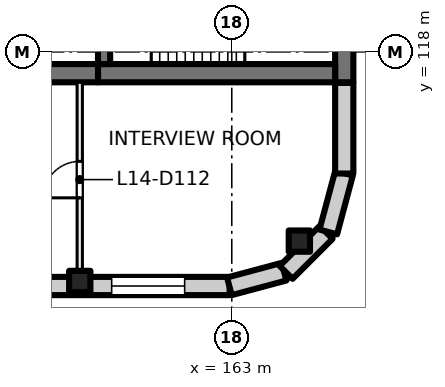
"""IFC4 building model, lengths in metres.
Left out: names, types, materials, properties, quantities, classifications, styles, units other than length and angle.
Written with IfcOpenShell. Run it as: python <this file> out.ifc"""

import sys

from ifc_helpers import new_model, si_unit, direction, frame, frame_2d, origin, origin_2d, place, context, subcontext, project, spatial, rectangle, extrude, element, fill, save


model = new_model("IFC4")
c1 = context("Model", 3, precision=1e-05, world=origin(), true_north=direction((0.0, 1.0)))
c2 = subcontext(c1, "Body", "Model", "MODEL_VIEW")
j1 = project(units=[si_unit("LENGTHUNIT", "METRE"), si_unit("PLANEANGLEUNIT", "RADIAN")], contexts=[c1])
p1 = place(None, origin())
s1 = spatial("IfcSite", under=j1, at=p1, CompositionType="ELEMENT")
p2 = place(p1, origin())
s2 = spatial("IfcBuilding", under=s1, at=p2, CompositionType="ELEMENT")
p3 = place(p2, frame((0.0, 0.0, 63.5)))
s3 = spatial("IfcBuildingStorey", under=s2, at=p3, CompositionType="ELEMENT", Elevation=63.5)
for number, where, z_axis, x_axis in (
    (1, (165.223, 111.777, 0.0), (0.0, 0.0, 1.0), (1.0, 0.0, 0.0)),
    (2, (158.0, 110.45, 0.0), (0.0, 0.0, 1.0), (1.0, 0.0, 0.0)),
):
    element("IfcColumn", number, at=place(p3, frame(where, z_axis=z_axis, x_axis=x_axis)), inside=s3, PredefinedType="COLUMN", context=c2, shape_type="SweptSolid", body=[
        extrude(rectangle(XDim=0.7, YDim=0.7, at=origin_2d()), origin(), (0.0, 0.0, 1.0), 4.0),
    ])
p4 = place(p3, frame((166.7, 120.8, 0.0), z_axis=(0.0, 0.0, 1.0), x_axis=(0.0, -1.0, 0.0)))
e3 = element("IfcWall", 3, at=p4, inside=s3, PredefinedType="SHEAR", context=c2, shape_type="SweptSolid", body=[
    extrude(rectangle(XDim=3.8, YDim=0.6, at=frame_2d((1.9, 0.0))), origin(), (0.0, 0.0, 1.0), 4.0),
])
p5 = place(p3, frame((166.4, 117.3, 0.0), z_axis=(0.0, 0.0, 1.0), x_axis=(-1.0, 0.0, 0.0)))
e4 = element("IfcWall", 4, at=p5, inside=s3, PredefinedType="SHEAR", context=c2, shape_type="SweptSolid", body=[
    extrude(rectangle(XDim=7.8, YDim=0.6, at=frame_2d((3.9, 0.0))), origin(), (0.0, 0.0, 1.0), 4.0),
])
p6 = place(p3, frame((158.6, 117.3, 0.0), z_axis=(0.0, 0.0, 1.0), x_axis=(-1.0, 0.0, 0.0)))
e5 = element("IfcWall", 5, at=p6, inside=s3, PredefinedType="SHEAR", context=c2, shape_type="SweptSolid", body=[
    extrude(rectangle(XDim=4.6, YDim=0.6, at=frame_2d((2.3, 0.0))), origin(), (0.0, 0.0, 1.0), 4.0),
])
p7 = place(p3, frame((158.8, 120.4, 0.0), z_axis=(0.0, 0.0, 1.0), x_axis=(0.0, -1.0, 0.0)))
e6 = element("IfcWall", 6, at=p7, inside=s3, PredefinedType="SHEAR", context=c2, shape_type="SweptSolid", body=[
    extrude(rectangle(XDim=2.8, YDim=0.4, at=frame_2d((1.4, 0.0))), origin(), (0.0, 0.0, 1.0), 4.0),
])
p8 = place(p7, frame((0.9, 0.0, 0.0)))
e7 = element("IfcOpeningElement", 7, at=p8, cuts=e6, PredefinedType="OPENING", context=c2, shape_type="SweptSolid", body=[
    extrude(rectangle(XDim=1.0, YDim=2.1, at=frame_2d((0.5, 1.05))), frame((0.0, 0.21, 0.0), z_axis=(0.0, -1.0, 0.0), x_axis=(1.0, 0.0, 0.0)), (0.0, 0.0, 1.0), 0.42),
])
p9 = place(p3, frame((162.93, 110.3, 0.0), z_axis=(0.0, 0.0, 1.0), x_axis=(-1.0, 0.0, 0.0)))
e8 = element("IfcWall", 8, at=p9, inside=s3, PredefinedType="SOLIDWALL", context=c2, shape_type="SweptSolid", body=[
    extrude(rectangle(XDim=31.93, YDim=0.6, at=frame_2d((15.965, 0.0))), origin(), (0.0, 0.0, 1.0), 3.625),
])
p10 = place(p9, frame((1.48, 0.0, 0.9)))
e9 = element("IfcOpeningElement", 9, at=p10, cuts=e8, PredefinedType="OPENING", context=c2, shape_type="SweptSolid", body=[
    extrude(rectangle(XDim=2.4, YDim=2.4, at=frame_2d((1.2, 1.2))), frame((0.0, 0.31, 0.0), z_axis=(0.0, -1.0, 0.0), x_axis=(1.0, 0.0, 0.0)), (0.0, 0.0, 1.0), 0.62),
])
p11 = place(p9, frame((5.98, 0.0, 0.9)))
e10 = element("IfcOpeningElement", 10, at=p11, cuts=e8, PredefinedType="OPENING", context=c2, shape_type="SweptSolid", body=[
    extrude(rectangle(XDim=2.4, YDim=2.4, at=frame_2d((1.2, 1.2))), frame((0.0, 0.31, 0.0), z_axis=(0.0, -1.0, 0.0), x_axis=(1.0, 0.0, 0.0)), (0.0, 0.0, 1.0), 0.62),
])
p12 = place(p9, frame((10.48, 0.0, 0.9)))
e11 = element("IfcOpeningElement", 11, at=p12, cuts=e8, PredefinedType="OPENING", context=c2, shape_type="SweptSolid", body=[
    extrude(rectangle(XDim=2.4, YDim=2.4, at=frame_2d((1.2, 1.2))), frame((0.0, 0.31, 0.0), z_axis=(0.0, -1.0, 0.0), x_axis=(1.0, 0.0, 0.0)), (0.0, 0.0, 1.0), 0.62),
])
p13 = place(p9, frame((14.98, 0.0, 0.9)))
e12 = element("IfcOpeningElement", 12, at=p13, cuts=e8, PredefinedType="OPENING", context=c2, shape_type="SweptSolid", body=[
    extrude(rectangle(XDim=2.4, YDim=2.4, at=frame_2d((1.2, 1.2))), frame((0.0, 0.31, 0.0), z_axis=(0.0, -1.0, 0.0), x_axis=(1.0, 0.0, 0.0)), (0.0, 0.0, 1.0), 0.62),
])
p14 = place(p9, frame((19.48, 0.0, 0.9)))
e13 = element("IfcOpeningElement", 13, at=p14, cuts=e8, PredefinedType="OPENING", context=c2, shape_type="SweptSolid", body=[
    extrude(rectangle(XDim=2.4, YDim=2.4, at=frame_2d((1.2, 1.2))), frame((0.0, 0.31, 0.0), z_axis=(0.0, -1.0, 0.0), x_axis=(1.0, 0.0, 0.0)), (0.0, 0.0, 1.0), 0.62),
])
p15 = place(p9, frame((23.98, 0.0, 0.9)))
e14 = element("IfcOpeningElement", 14, at=p15, cuts=e8, PredefinedType="OPENING", context=c2, shape_type="SweptSolid", body=[
    extrude(rectangle(XDim=2.4, YDim=2.4, at=frame_2d((1.2, 1.2))), frame((0.0, 0.31, 0.0), z_axis=(0.0, -1.0, 0.0), x_axis=(1.0, 0.0, 0.0)), (0.0, 0.0, 1.0), 0.62),
])
p16 = place(p9, frame((28.48, 0.0, 0.9)))
e15 = element("IfcOpeningElement", 15, at=p16, cuts=e8, PredefinedType="OPENING", context=c2, shape_type="SweptSolid", body=[
    extrude(rectangle(XDim=2.4, YDim=2.4, at=frame_2d((1.2, 1.2))), frame((0.0, 0.31, 0.0), z_axis=(0.0, -1.0, 0.0), x_axis=(1.0, 0.0, 0.0)), (0.0, 0.0, 1.0), 0.62),
])
for number, where, z_axis, x_axis in (
    (16, (164.719, 110.771, 0.0), (0.0, 0.0, 1.0), (-0.966, -0.259, 0.0)),
    (17, (166.104, 112.064, 0.0), (0.0, 0.0, 1.0), (-0.707, -0.707, 0.0)),
):
    element("IfcWall", number, at=place(p3, frame(where, z_axis=z_axis, x_axis=x_axis)), inside=s3, PredefinedType="SOLIDWALL", context=c2, shape_type="SweptSolid", body=[
        extrude(rectangle(XDim=1.861, YDim=0.6, at=frame_2d((0.93, 0.0))), origin(), (0.0, 0.0, 1.0), 3.625),
    ])
p17 = place(p3, frame((166.692, 114.01, 0.0), z_axis=(0.0, 0.0, 1.0), x_axis=(-0.258839784042, -0.965920269068, 0.0)))
e18 = element("IfcWall", 18, at=p17, inside=s3, PredefinedType="SOLIDWALL", context=c2, shape_type="SweptSolid", body=[
    extrude(rectangle(XDim=2.0, YDim=0.6, at=frame_2d((1.0, 0.0))), origin(), (0.0, 0.0, 1.0), 3.625),
])
p18 = place(p3, frame((166.7, 116.98, 0.0), z_axis=(0.0, 0.0, 1.0), x_axis=(0.0, -1.0, 0.0)))
e19 = element("IfcWall", 19, at=p18, inside=s3, PredefinedType="SOLIDWALL", context=c2, shape_type="SweptSolid", body=[
    extrude(rectangle(XDim=2.98, YDim=0.6, at=frame_2d((1.49, 0.0))), origin(), (0.0, 0.0, 1.0), 3.625),
])
p19 = place(p3, frame((158.0, 110.6, 0.0), z_axis=(0.0, 0.0, 1.0), x_axis=(0.0, 1.0, 0.0)))
e20 = element("IfcWall", 20, at=p19, inside=s3, PredefinedType="PARTITIONING", context=c2, shape_type="SweptSolid", body=[
    extrude(rectangle(XDim=6.4, YDim=0.175, at=frame_2d((3.2, 0.0))), origin(), (0.0, 0.0, 1.0), 3.625),
])
p20 = place(p19, frame((2.6, 0.0, 0.0)))
e21 = element("IfcOpeningElement", 21, at=p20, cuts=e20, PredefinedType="OPENING", context=c2, shape_type="SweptSolid", body=[
    extrude(rectangle(XDim=1.2, YDim=2.1, at=frame_2d((0.6, 1.05))), frame((0.0, 0.097, 0.0), z_axis=(0.0, -1.0, 0.0), x_axis=(1.0, 0.0, 0.0)), (0.0, 0.0, 1.0), 0.195),
])
p21 = place(p10, origin())
e22 = element("IfcWindow", 22, at=p21, inside=s3, PartitioningType="SINGLE_PANEL", PredefinedType="WINDOW", context=c2, shape_type="SweptSolid", body=[
    extrude(rectangle(XDim=2.4, YDim=2.4, at=frame_2d((1.2, 1.2))), frame((0.0, 0.03, 0.0), z_axis=(0.0, -1.0, 0.0), x_axis=(1.0, 0.0, 0.0)), (0.0, 0.0, 1.0), 0.06),
])
fill(e9, e22)
p22 = place(p20, origin())
e23 = element("IfcDoor", 23, at=p22, inside=s3, OperationType="DOUBLE_DOOR_SINGLE_SWING", PredefinedType="DOOR", context=c2, shape_type="SweptSolid", body=[
    extrude(rectangle(XDim=1.2, YDim=2.1, at=frame_2d((0.6, 1.05))), frame((0.0, 0.025, 0.0), z_axis=(0.0, -1.0, 0.0), x_axis=(1.0, 0.0, 0.0)), (0.0, 0.0, 1.0), 0.05),
])
fill(e21, e23)
save(model, sys.argv[1])
